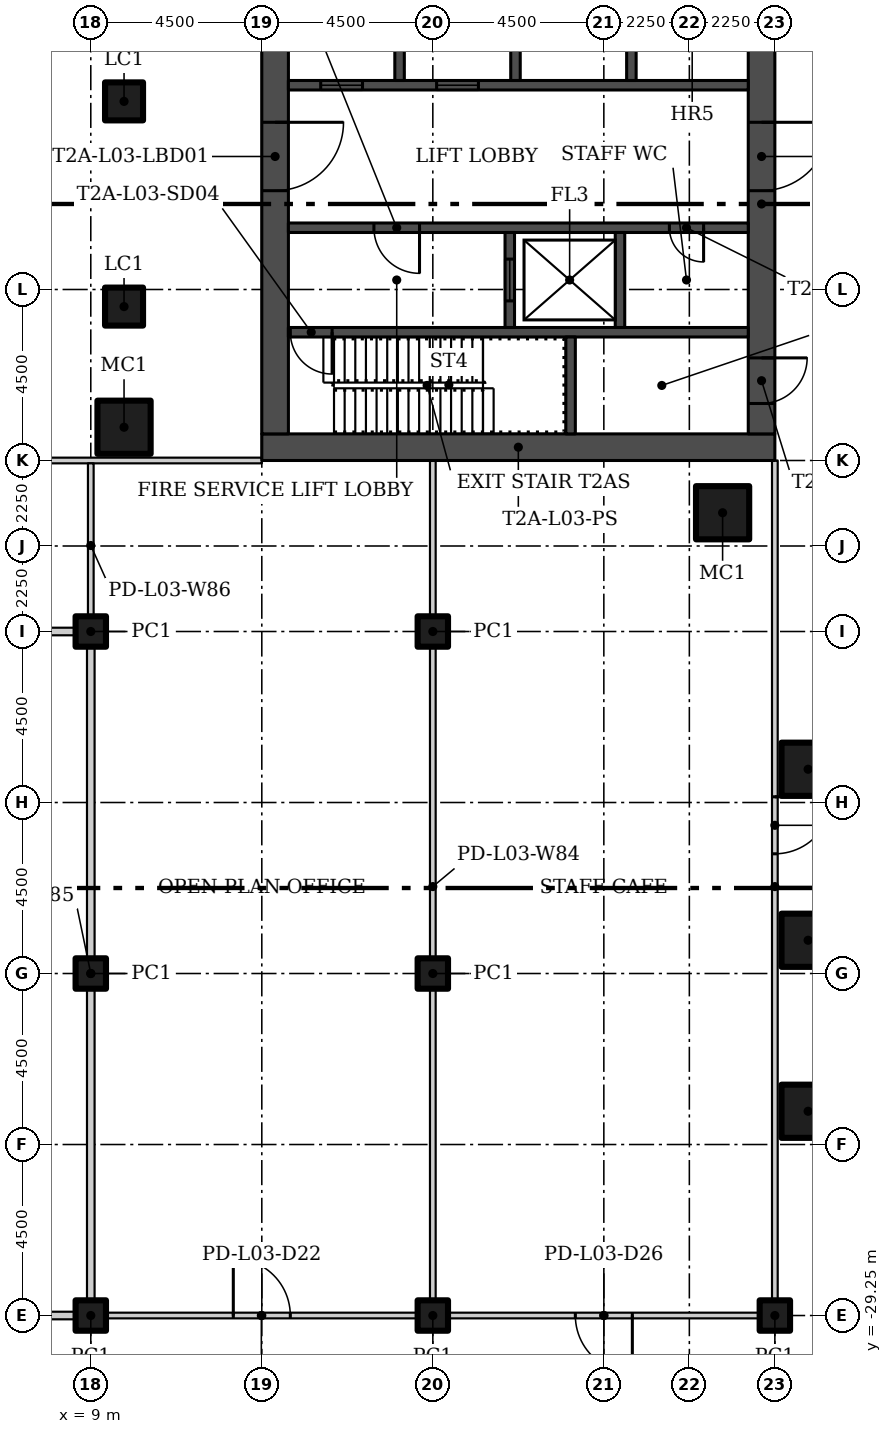
"""IFC4 building model, lengths in metres.
Left out: names, types, materials, properties, quantities, classifications, styles, units other than length and angle.
Written with IfcOpenShell. Run it as: python <this file> out.ifc"""

import sys

from ifc_helpers import new_model, si_unit, direction, frame, frame_2d, origin, origin_2d, place, context, subcontext, project, spatial, rectangle, hollow_rectangle, extrude, element, fill, save


model = new_model("IFC4")
c1 = context("Model", 3, precision=1e-05, world=origin(), true_north=direction((0.0, 1.0)))
c2 = subcontext(c1, "Body", "Model", "MODEL_VIEW")
j1 = project(units=[si_unit("LENGTHUNIT", "METRE"), si_unit("PLANEANGLEUNIT", "RADIAN")], contexts=[c1])
p1 = place(None, origin())
s1 = spatial("IfcSite", under=j1, at=p1, CompositionType="ELEMENT")
p2 = place(p1, origin())
s2 = spatial("IfcBuilding", under=s1, at=p2, CompositionType="ELEMENT")
p3 = place(p2, frame((0.0, 0.0, 18.5)))
s3 = spatial("IfcBuildingStorey", under=s2, at=p3, CompositionType="ELEMENT", Elevation=18.5)
for number, where in (
    (1, (25.625, -8.125, 0.0)),
    (2, (27.875, -14.875, 0.0)),
    (3, (27.875, -19.375, 0.0)),
    (4, (27.875, -23.875, 0.0)),
    (5, (9.875, -5.875, 0.0)),
):
    element("IfcColumn", number, at=place(p3, frame(where)), inside=s3, PredefinedType="COLUMN", context=c2, shape_type="SweptSolid", body=[
        extrude(hollow_rectangle(XDim=1.4, YDim=1.4, WallThickness=0.06, at=origin_2d()), origin(), (0.0, 0.0, 1.0), 4.6),
    ])
for number, where in (
    (6, (9.0, -29.25, 0.0)),
    (7, (9.0, -20.25, 0.0)),
    (8, (9.0, -11.25, 0.0)),
    (9, (18.0, -29.25, 0.0)),
    (10, (18.0, -20.25, 0.0)),
    (11, (18.0, -11.25, 0.0)),
    (12, (27.0, -29.25, 0.0)),
):
    element("IfcColumn", number, at=place(p3, frame(where)), inside=s3, PredefinedType="COLUMN", context=c2, shape_type="SweptSolid", body=[
        extrude(hollow_rectangle(XDim=0.8, YDim=0.8, WallThickness=0.03, at=origin_2d()), origin(), (0.0, 0.0, 1.0), 4.6),
    ])
for number, where in (
    (13, (9.875, -2.7, 0.0)),
    (14, (9.875, 2.7, 0.0)),
):
    element("IfcColumn", number, at=place(p3, frame(where)), inside=s3, PredefinedType="COLUMN", context=c2, shape_type="SweptSolid", body=[
        extrude(hollow_rectangle(XDim=1.0, YDim=1.0, WallThickness=0.04, at=origin_2d()), origin(), (0.0, 0.0, 1.0), 4.6),
    ])
p4 = place(p3, frame((27.0, -6.75, 0.0), z_axis=(0.0, 0.0, 1.0), x_axis=(0.0, -1.0, 0.0)))
e15 = element("IfcWall", 15, at=p4, inside=s3, PredefinedType="PARTITIONING", context=c2, shape_type="SweptSolid", body=[
    extrude(rectangle(XDim=22.425, YDim=0.15, at=frame_2d((11.212, 0.0))), origin(), (0.0, 0.0, 1.0), 4.6),
])
p5 = place(p4, frame((8.85, 0.0, 0.0)))
e16 = element("IfcOpeningElement", 16, at=p5, cuts=e15, PredefinedType="OPENING", context=c2, shape_type="SweptSolid", body=[
    extrude(rectangle(XDim=1.5, YDim=2.1, at=frame_2d((0.75, 1.05))), frame((0.0, 0.085, 0.0), z_axis=(0.0, -1.0, 0.0), x_axis=(1.0, 0.0, 0.0)), (0.0, 0.0, 1.0), 0.17),
])
p6 = place(p3, frame((13.5, -6.75, 0.0), z_axis=(0.0, 0.0, 1.0), x_axis=(-1.0, 0.0, 0.0)))
e17 = element("IfcWall", 17, at=p6, inside=s3, PredefinedType="PARTITIONING", context=c2, shape_type="SweptSolid", body=[
    extrude(rectangle(XDim=27.0, YDim=0.15, at=frame_2d((13.5, 0.0))), origin(), (0.0, 0.0, 1.0), 4.6),
])
p7 = place(p6, frame((8.25, 0.0, 0.0)))
e18 = element("IfcOpeningElement", 18, at=p7, cuts=e17, PredefinedType="OPENING", context=c2, shape_type="SweptSolid", body=[
    extrude(rectangle(XDim=1.5, YDim=2.1, at=frame_2d((0.75, 1.05))), frame((0.0, 0.085, 0.0), z_axis=(0.0, -1.0, 0.0), x_axis=(1.0, 0.0, 0.0)), (0.0, 0.0, 1.0), 0.17),
])
p8 = place(p6, frame((16.65, 0.0, 0.0)))
e19 = element("IfcOpeningElement", 19, at=p8, cuts=e17, PredefinedType="OPENING", context=c2, shape_type="SweptSolid", body=[
    extrude(rectangle(XDim=1.5, YDim=2.1, at=frame_2d((0.75, 1.05))), frame((0.0, 0.085, 0.0), z_axis=(0.0, -1.0, 0.0), x_axis=(1.0, 0.0, 0.0)), (0.0, 0.0, 1.0), 0.17),
])
p9 = place(p3, frame((8.9, -29.25, 0.0)))
e20 = element("IfcWall", 20, at=p9, inside=s3, PredefinedType="PARTITIONING", context=c2, shape_type="SweptSolid", body=[
    extrude(rectangle(XDim=9.175, YDim=0.15, at=frame_2d((4.587, 0.0))), origin(), (0.0, 0.0, 1.0), 4.6),
])
p10 = place(p9, frame((3.85, 0.0, 0.0)))
e21 = element("IfcOpeningElement", 21, at=p10, cuts=e20, PredefinedType="OPENING", context=c2, shape_type="SweptSolid", body=[
    extrude(rectangle(XDim=1.5, YDim=2.1, at=frame_2d((0.75, 1.05))), frame((0.0, 0.085, 0.0), z_axis=(0.0, -1.0, 0.0), x_axis=(1.0, 0.0, 0.0)), (0.0, 0.0, 1.0), 0.17),
])
p11 = place(p3, frame((27.075, -29.25, 0.0), z_axis=(0.0, 0.0, 1.0), x_axis=(-1.0, 0.0, 0.0)))
e22 = element("IfcWall", 22, at=p11, inside=s3, PredefinedType="PARTITIONING", context=c2, shape_type="SweptSolid", body=[
    extrude(rectangle(XDim=9.15, YDim=0.15, at=frame_2d((4.575, 0.0))), origin(), (0.0, 0.0, 1.0), 4.6),
])
p12 = place(p11, frame((3.825, 0.0, 0.0)))
e23 = element("IfcOpeningElement", 23, at=p12, cuts=e22, PredefinedType="OPENING", context=c2, shape_type="SweptSolid", body=[
    extrude(rectangle(XDim=1.5, YDim=2.1, at=frame_2d((0.75, 1.05))), frame((0.0, 0.085, 0.0), z_axis=(0.0, -1.0, 0.0), x_axis=(1.0, 0.0, 0.0)), (0.0, 0.0, 1.0), 0.17),
])
p13 = place(p3, frame((-0.1, -29.25, 0.0)))
e24 = element("IfcWall", 24, at=p13, inside=s3, PredefinedType="PARTITIONING", context=c2, shape_type="SweptSolid", body=[
    extrude(rectangle(XDim=9.2, YDim=0.2, at=frame_2d((4.6, 0.0))), origin(), (0.0, 0.0, 1.0), 4.6),
])
p14 = place(p13, frame((3.85, 0.0, 0.0)))
e25 = element("IfcOpeningElement", 25, at=p14, cuts=e24, PredefinedType="OPENING", context=c2, shape_type="SweptSolid", body=[
    extrude(rectangle(XDim=1.5, YDim=2.4, at=frame_2d((0.75, 1.2))), frame((0.0, 0.11, 0.0), z_axis=(0.0, -1.0, 0.0), x_axis=(1.0, 0.0, 0.0)), (0.0, 0.0, 1.0), 0.22),
])
p15 = place(p3, frame((9.1, -11.25, 0.0), z_axis=(0.0, 0.0, 1.0), x_axis=(-1.0, 0.0, 0.0)))
e26 = element("IfcWall", 26, at=p15, inside=s3, PredefinedType="PARTITIONING", context=c2, shape_type="SweptSolid", body=[
    extrude(rectangle(XDim=9.2, YDim=0.2, at=frame_2d((4.6, 0.0))), origin(), (0.0, 0.0, 1.0), 4.6),
])
p16 = place(p3, frame((18.0, -29.175, 0.0), z_axis=(0.0, 0.0, 1.0), x_axis=(0.0, 1.0, 0.0)))
e27 = element("IfcWall", 27, at=p16, inside=s3, PredefinedType="PARTITIONING", context=c2, shape_type="SweptSolid", body=[
    extrude(rectangle(XDim=22.425, YDim=0.15, at=frame_2d((11.212, 0.0))), origin(), (0.0, 0.0, 1.0), 4.6),
])
p17 = place(p3, frame((9.0, -11.35, 0.0), z_axis=(0.0, 0.0, 1.0), x_axis=(0.0, -1.0, 0.0)))
e28 = element("IfcWall", 28, at=p17, inside=s3, PredefinedType="PARTITIONING", context=c2, shape_type="SweptSolid", body=[
    extrude(rectangle(XDim=17.8, YDim=0.2, at=frame_2d((8.9, 0.0))), origin(), (0.0, 0.0, 1.0), 4.6),
])
p18 = place(p3, frame((9.0, -6.825, 0.0), z_axis=(0.0, 0.0, 1.0), x_axis=(0.0, -1.0, 0.0)))
e29 = element("IfcWall", 29, at=p18, inside=s3, PredefinedType="PARTITIONING", context=c2, shape_type="SweptSolid", body=[
    extrude(rectangle(XDim=4.325, YDim=0.15, at=frame_2d((2.163, 0.0))), origin(), (0.0, 0.0, 1.0), 4.6),
])
p19 = place(p3, frame((13.5, -6.4, 0.0)))
e30 = element("IfcWall", 30, at=p19, inside=s3, PredefinedType="SHEAR", context=c2, shape_type="SweptSolid", body=[
    extrude(rectangle(XDim=13.5, YDim=0.7, at=frame_2d((6.75, 0.0))), origin(), (0.0, 0.0, 1.0), 4.6),
])
p20 = place(p3, frame((13.85, 6.05, 0.0), z_axis=(0.0, 0.0, 1.0), x_axis=(0.0, -1.0, 0.0)))
e31 = element("IfcWall", 31, at=p20, inside=s3, PredefinedType="SHEAR", context=c2, shape_type="SweptSolid", body=[
    extrude(rectangle(XDim=12.1, YDim=0.7, at=frame_2d((6.05, 0.0))), origin(), (0.0, 0.0, 1.0), 4.6),
])
p21 = place(p20, frame((3.9, 0.0, 0.0)))
e32 = element("IfcOpeningElement", 32, at=p21, cuts=e31, PredefinedType="OPENING", context=c2, shape_type="SweptSolid", body=[
    extrude(rectangle(XDim=1.8, YDim=2.4, at=frame_2d((0.9, 1.2))), frame((0.0, 0.36, 0.0), z_axis=(0.0, -1.0, 0.0), x_axis=(1.0, 0.0, 0.0)), (0.0, 0.0, 1.0), 0.72),
])
p22 = place(p3, frame((26.65, 6.05, 0.0), z_axis=(0.0, 0.0, 1.0), x_axis=(0.0, -1.0, 0.0)))
e33 = element("IfcWall", 33, at=p22, inside=s3, PredefinedType="SHEAR", context=c2, shape_type="SweptSolid", body=[
    extrude(rectangle(XDim=12.1, YDim=0.7, at=frame_2d((6.05, 0.0))), origin(), (0.0, 0.0, 1.0), 4.6),
])
p23 = place(p22, frame((10.1, 0.0, 0.0)))
e34 = element("IfcOpeningElement", 34, at=p23, cuts=e33, PredefinedType="OPENING", context=c2, shape_type="SweptSolid", body=[
    extrude(rectangle(XDim=1.2, YDim=2.1, at=frame_2d((0.6, 1.05))), frame((0.0, 0.36, 0.0), z_axis=(0.0, -1.0, 0.0), x_axis=(1.0, 0.0, 0.0)), (0.0, 0.0, 1.0), 0.72),
])
p24 = place(p22, frame((3.9, 0.0, 0.0)))
e35 = element("IfcOpeningElement", 35, at=p24, cuts=e33, PredefinedType="OPENING", context=c2, shape_type="SweptSolid", body=[
    extrude(rectangle(XDim=1.8, YDim=2.4, at=frame_2d((0.9, 1.2))), frame((0.0, 0.36, 0.0), z_axis=(0.0, -1.0, 0.0), x_axis=(1.0, 0.0, 0.0)), (0.0, 0.0, 1.0), 0.72),
])
p25 = place(p3, frame((26.3, -3.375, 0.0), z_axis=(0.0, 0.0, 1.0), x_axis=(-1.0, 0.0, 0.0)))
e36 = element("IfcWall", 36, at=p25, inside=s3, PredefinedType="SHEAR", context=c2, shape_type="SweptSolid", body=[
    extrude(rectangle(XDim=12.1, YDim=0.25, at=frame_2d((6.05, 0.0))), origin(), (0.0, 0.0, 1.0), 4.6),
])
p26 = place(p25, frame((10.95, 0.0, 0.0)))
e37 = element("IfcOpeningElement", 37, at=p26, cuts=e36, PredefinedType="OPENING", context=c2, shape_type="SweptSolid", body=[
    extrude(rectangle(XDim=1.1, YDim=2.1, at=frame_2d((0.55, 1.05))), frame((0.0, 0.135, 0.0), z_axis=(0.0, -1.0, 0.0), x_axis=(1.0, 0.0, 0.0)), (0.0, 0.0, 1.0), 0.27),
])
p27 = place(p3, frame((21.625, -6.05, 0.0), z_axis=(0.0, 0.0, 1.0), x_axis=(0.0, 1.0, 0.0)))
e38 = element("IfcWall", 38, at=p27, inside=s3, PredefinedType="SHEAR", context=c2, shape_type="SweptSolid", body=[
    extrude(rectangle(XDim=2.55, YDim=0.25, at=frame_2d((1.275, 0.0))), origin(), (0.0, 0.0, 1.0), 4.6),
])
p28 = place(p3, frame((26.3, -0.625, 0.0), z_axis=(0.0, 0.0, 1.0), x_axis=(-1.0, 0.0, 0.0)))
e39 = element("IfcWall", 39, at=p28, inside=s3, PredefinedType="SHEAR", context=c2, shape_type="SweptSolid", body=[
    extrude(rectangle(XDim=12.1, YDim=0.25, at=frame_2d((6.05, 0.0))), origin(), (0.0, 0.0, 1.0), 4.6),
])
p29 = place(p28, frame((8.65, 0.0, 0.0)))
e40 = element("IfcOpeningElement", 40, at=p29, cuts=e39, PredefinedType="OPENING", context=c2, shape_type="SweptSolid", body=[
    extrude(rectangle(XDim=1.2, YDim=2.1, at=frame_2d((0.6, 1.05))), frame((0.0, 0.135, 0.0), z_axis=(0.0, -1.0, 0.0), x_axis=(1.0, 0.0, 0.0)), (0.0, 0.0, 1.0), 0.27),
])
p30 = place(p28, frame((1.175, 0.0, 0.0)))
e41 = element("IfcOpeningElement", 41, at=p30, cuts=e39, PredefinedType="OPENING", context=c2, shape_type="SweptSolid", body=[
    extrude(rectangle(XDim=0.9, YDim=2.1, at=frame_2d((0.45, 1.05))), frame((0.0, 0.135, 0.0), z_axis=(0.0, -1.0, 0.0), x_axis=(1.0, 0.0, 0.0)), (0.0, 0.0, 1.0), 0.27),
])
p31 = place(p3, frame((20.025, -3.25, 0.0), z_axis=(0.0, 0.0, 1.0), x_axis=(0.0, 1.0, 0.0)))
e42 = element("IfcWall", 42, at=p31, inside=s3, PredefinedType="SHEAR", context=c2, shape_type="SweptSolid", body=[
    extrude(rectangle(XDim=2.5, YDim=0.25, at=frame_2d((1.25, 0.0))), origin(), (0.0, 0.0, 1.0), 4.6),
])
p32 = place(p31, frame((0.7, 0.0, 0.0)))
e43 = element("IfcOpeningElement", 43, at=p32, cuts=e42, PredefinedType="OPENING", context=c2, shape_type="SweptSolid", body=[
    extrude(rectangle(XDim=1.1, YDim=2.1, at=frame_2d((0.55, 1.05))), frame((0.0, 0.135, 0.0), z_axis=(0.0, -1.0, 0.0), x_axis=(1.0, 0.0, 0.0)), (0.0, 0.0, 1.0), 0.27),
])
p33 = place(p3, frame((22.925, -3.25, 0.0), z_axis=(0.0, 0.0, 1.0), x_axis=(0.0, 1.0, 0.0)))
e44 = element("IfcWall", 44, at=p33, inside=s3, PredefinedType="SHEAR", context=c2, shape_type="SweptSolid", body=[
    extrude(rectangle(XDim=2.5, YDim=0.25, at=frame_2d((1.25, 0.0))), origin(), (0.0, 0.0, 1.0), 4.6),
])
p34 = place(p3, frame((14.2, 3.125, 0.0)))
e45 = element("IfcWall", 45, at=p34, inside=s3, PredefinedType="SHEAR", context=c2, shape_type="SweptSolid", body=[
    extrude(rectangle(XDim=12.1, YDim=0.25, at=frame_2d((6.05, 0.0))), origin(), (0.0, 0.0, 1.0), 4.6),
])
p35 = place(p34, frame((0.85, 0.0, 0.0)))
e46 = element("IfcOpeningElement", 46, at=p35, cuts=e45, PredefinedType="OPENING", context=c2, shape_type="SweptSolid", body=[
    extrude(rectangle(XDim=1.1, YDim=2.1, at=frame_2d((0.55, 1.05))), frame((0.0, 0.135, 0.0), z_axis=(0.0, -1.0, 0.0), x_axis=(1.0, 0.0, 0.0)), (0.0, 0.0, 1.0), 0.27),
])
p36 = place(p34, frame((3.9, 0.0, 0.0)))
e47 = element("IfcOpeningElement", 47, at=p36, cuts=e45, PredefinedType="OPENING", context=c2, shape_type="SweptSolid", body=[
    extrude(rectangle(XDim=1.1, YDim=2.1, at=frame_2d((0.55, 1.05))), frame((0.0, 0.135, 0.0), z_axis=(0.0, -1.0, 0.0), x_axis=(1.0, 0.0, 0.0)), (0.0, 0.0, 1.0), 0.27),
])
for number, where, z_axis, x_axis in (
    (48, (17.125, 3.25, 0.0), (0.0, 0.0, 1.0), (0.0, 1.0, 0.0)),
    (49, (20.175, 3.25, 0.0), (0.0, 0.0, 1.0), (0.0, 1.0, 0.0)),
    (50, (23.225, 3.25, 0.0), (0.0, 0.0, 1.0), (0.0, 1.0, 0.0)),
):
    element("IfcWall", number, at=place(p3, frame(where, z_axis=z_axis, x_axis=x_axis)), inside=s3, PredefinedType="SHEAR", context=c2, shape_type="SweptSolid", body=[
        extrude(rectangle(XDim=2.8, YDim=0.25, at=frame_2d((1.4, 0.0))), origin(), (0.0, 0.0, 1.0), 4.6),
    ])
p37 = place(p10, origin())
e51 = element("IfcDoor", 51, at=p37, inside=s3, OperationType="DOUBLE_DOOR_SINGLE_SWING", PredefinedType="DOOR", context=c2, shape_type="SweptSolid", body=[
    extrude(rectangle(XDim=1.5, YDim=2.1, at=frame_2d((0.75, 1.05))), frame((0.0, 0.025, 0.0), z_axis=(0.0, -1.0, 0.0), x_axis=(1.0, 0.0, 0.0)), (0.0, 0.0, 1.0), 0.05),
])
fill(e21, e51)
p38 = place(p12, origin())
e52 = element("IfcDoor", 52, at=p38, inside=s3, OperationType="DOUBLE_DOOR_SINGLE_SWING", PredefinedType="DOOR", context=c2, shape_type="SweptSolid", body=[
    extrude(rectangle(XDim=1.5, YDim=2.1, at=frame_2d((0.75, 1.05))), frame((0.0, 0.025, 0.0), z_axis=(0.0, -1.0, 0.0), x_axis=(1.0, 0.0, 0.0)), (0.0, 0.0, 1.0), 0.05),
])
fill(e23, e52)
p39 = place(p5, origin())
e53 = element("IfcDoor", 53, at=p39, inside=s3, OperationType="DOUBLE_DOOR_SINGLE_SWING", PredefinedType="DOOR", context=c2, shape_type="SweptSolid", body=[
    extrude(rectangle(XDim=1.5, YDim=2.1, at=frame_2d((0.75, 1.05))), frame((0.0, 0.025, 0.0), z_axis=(0.0, -1.0, 0.0), x_axis=(1.0, 0.0, 0.0)), (0.0, 0.0, 1.0), 0.05),
])
fill(e16, e53)
p40 = place(p21, origin())
e54 = element("IfcDoor", 54, at=p40, inside=s3, OperationType="DOUBLE_DOOR_SINGLE_SWING", PredefinedType="DOOR", context=c2, shape_type="SweptSolid", body=[
    extrude(rectangle(XDim=1.8, YDim=2.4, at=frame_2d((0.9, 1.2))), frame((0.0, 0.025, 0.0), z_axis=(0.0, -1.0, 0.0), x_axis=(1.0, 0.0, 0.0)), (0.0, 0.0, 1.0), 0.05),
])
fill(e32, e54)
p41 = place(p23, origin())
e55 = element("IfcDoor", 55, at=p41, inside=s3, OperationType="SINGLE_SWING_RIGHT", PredefinedType="DOOR", context=c2, shape_type="SweptSolid", body=[
    extrude(rectangle(XDim=1.2, YDim=2.1, at=frame_2d((0.6, 1.05))), frame((0.0, 0.025, 0.0), z_axis=(0.0, -1.0, 0.0), x_axis=(1.0, 0.0, 0.0)), (0.0, 0.0, 1.0), 0.05),
])
fill(e34, e55)
p42 = place(p24, origin())
e56 = element("IfcDoor", 56, at=p42, inside=s3, OperationType="DOUBLE_DOOR_SINGLE_SWING", PredefinedType="DOOR", context=c2, shape_type="SweptSolid", body=[
    extrude(rectangle(XDim=1.8, YDim=2.4, at=frame_2d((0.9, 1.2))), frame((0.0, 0.025, 0.0), z_axis=(0.0, -1.0, 0.0), x_axis=(1.0, 0.0, 0.0)), (0.0, 0.0, 1.0), 0.05),
])
fill(e35, e56)
p43 = place(p26, origin())
e57 = element("IfcDoor", 57, at=p43, inside=s3, OperationType="SINGLE_SWING_RIGHT", PredefinedType="DOOR", context=c2, shape_type="SweptSolid", body=[
    extrude(rectangle(XDim=1.1, YDim=2.1, at=frame_2d((0.55, 1.05))), frame((0.0, 0.025, 0.0), z_axis=(0.0, -1.0, 0.0), x_axis=(1.0, 0.0, 0.0)), (0.0, 0.0, 1.0), 0.05),
])
fill(e37, e57)
p44 = place(p29, origin())
e58 = element("IfcDoor", 58, at=p44, inside=s3, OperationType="SINGLE_SWING_RIGHT", PredefinedType="DOOR", context=c2, shape_type="SweptSolid", body=[
    extrude(rectangle(XDim=1.2, YDim=2.1, at=frame_2d((0.6, 1.05))), frame((0.0, 0.025, 0.0), z_axis=(0.0, -1.0, 0.0), x_axis=(1.0, 0.0, 0.0)), (0.0, 0.0, 1.0), 0.05),
])
fill(e40, e58)
p45 = place(p30, origin())
e59 = element("IfcDoor", 59, at=p45, inside=s3, OperationType="SINGLE_SWING_LEFT", PredefinedType="DOOR", context=c2, shape_type="SweptSolid", body=[
    extrude(rectangle(XDim=0.9, YDim=2.1, at=frame_2d((0.45, 1.05))), frame((0.0, 0.025, 0.0), z_axis=(0.0, -1.0, 0.0), x_axis=(1.0, 0.0, 0.0)), (0.0, 0.0, 1.0), 0.05),
])
fill(e41, e59)
p46 = place(p32, origin())
e60 = element("IfcDoor", 60, at=p46, inside=s3, OperationType="SLIDING_TO_LEFT", PredefinedType="DOOR", context=c2, shape_type="SweptSolid", body=[
    extrude(rectangle(XDim=1.1, YDim=2.1, at=frame_2d((0.55, 1.05))), frame((0.0, 0.025, 0.0), z_axis=(0.0, -1.0, 0.0), x_axis=(1.0, 0.0, 0.0)), (0.0, 0.0, 1.0), 0.05),
])
fill(e43, e60)
p47 = place(p35, origin())
e61 = element("IfcDoor", 61, at=p47, inside=s3, OperationType="SLIDING_TO_LEFT", PredefinedType="DOOR", context=c2, shape_type="SweptSolid", body=[
    extrude(rectangle(XDim=1.1, YDim=2.1, at=frame_2d((0.55, 1.05))), frame((0.0, 0.025, 0.0), z_axis=(0.0, -1.0, 0.0), x_axis=(1.0, 0.0, 0.0)), (0.0, 0.0, 1.0), 0.05),
])
fill(e46, e61)
p48 = place(p36, origin())
e62 = element("IfcDoor", 62, at=p48, inside=s3, OperationType="SLIDING_TO_LEFT", PredefinedType="DOOR", context=c2, shape_type="SweptSolid", body=[
    extrude(rectangle(XDim=1.1, YDim=2.1, at=frame_2d((0.55, 1.05))), frame((0.0, 0.025, 0.0), z_axis=(0.0, -1.0, 0.0), x_axis=(1.0, 0.0, 0.0)), (0.0, 0.0, 1.0), 0.05),
])
fill(e47, e62)
save(model, sys.argv[1])
